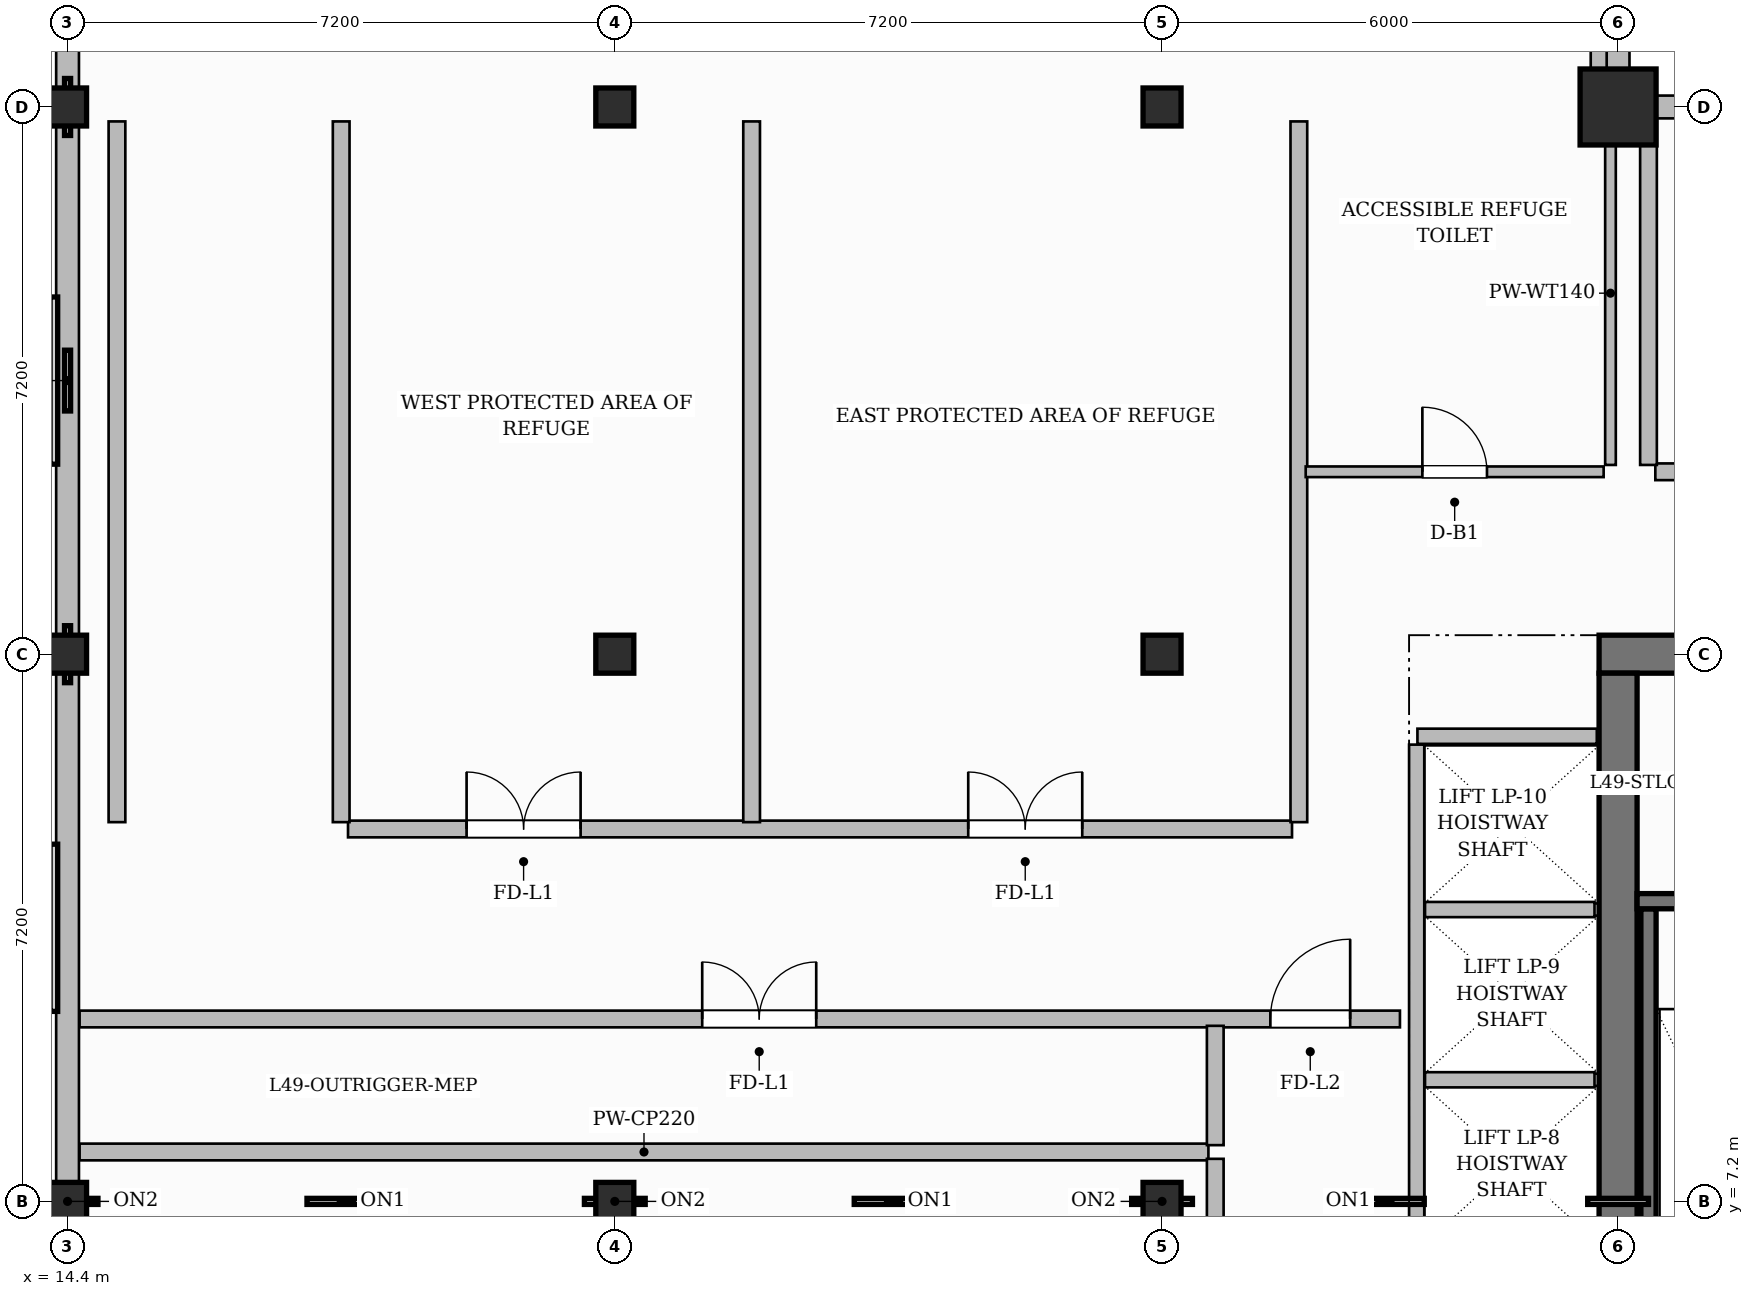
"""IFC4 building model, lengths in metres.
Left out: names, types, materials, properties, quantities, classifications, styles, units other than length and angle.
Written with IfcOpenShell. Run it as: python <this file> out.ifc"""

import sys

from ifc_helpers import new_model, si_unit, direction, frame, frame_2d, origin, origin_2d, place, context, subcontext, project, spatial, rectangle, hollow_rectangle, extrude, source, transform, mapped, element, fill, save


model = new_model("IFC4")
c1 = context("Model", 3, precision=1e-05, world=origin(), true_north=direction((0.0, 1.0)))
c2 = subcontext(c1, "Body", "Model", "MODEL_VIEW")
j1 = project(units=[si_unit("LENGTHUNIT", "METRE"), si_unit("PLANEANGLEUNIT", "RADIAN")], contexts=[c1])
p1 = place(None, origin())
s1 = spatial("IfcSite", under=j1, at=p1, CompositionType="ELEMENT")
p2 = place(p1, origin())
s2 = spatial("IfcBuilding", under=s1, at=p2, CompositionType="ELEMENT")
p3 = place(p2, frame((0.0, 0.0, 196.5)))
s3 = spatial("IfcBuildingStorey", under=s2, at=p3, CompositionType="ELEMENT", Elevation=196.5)
p4 = place(p3, frame((34.55, 14.4, 0.0), z_axis=(0.0, 0.0, 1.0), x_axis=(1.0, 0.0, 0.0)))
e1 = element("IfcWall", 1, at=p4, inside=s3, PredefinedType="SHEAR", context=c2, shape_type="SweptSolid", body=[
    extrude(rectangle(XDim=15.5, YDim=0.5, at=frame_2d((7.75, 0.0))), origin(), (0.0, 0.0, 1.0), 5.4),
])
p5 = place(p4, frame((5.38, 0.0, 0.0)))
e2 = element("IfcOpeningElement", 2, at=p5, cuts=e1, PredefinedType="OPENING", context=c2, shape_type="SweptSolid", body=[
    extrude(rectangle(XDim=1.5, YDim=2.2, at=frame_2d((0.75, 1.1))), frame((0.0, 0.26, 0.0), z_axis=(0.0, -1.0, 0.0), x_axis=(1.0, 0.0, 0.0)), (0.0, 0.0, 1.0), 0.52),
])
p6 = place(p4, frame((1.595, 0.0, 0.0)))
e3 = element("IfcOpeningElement", 3, at=p6, cuts=e1, PredefinedType="OPENING", context=c2, shape_type="SweptSolid", body=[
    extrude(rectangle(XDim=1.05, YDim=2.15, at=frame_2d((0.525, 1.075))), frame((0.0, 0.26, 0.0), z_axis=(0.0, -1.0, 0.0), x_axis=(1.0, 0.0, 0.0)), (0.0, 0.0, 1.0), 0.52),
])
p7 = place(p4, frame((11.225, 0.0, 0.0)))
e4 = element("IfcOpeningElement", 4, at=p7, cuts=e1, PredefinedType="OPENING", context=c2, shape_type="SweptSolid", body=[
    extrude(rectangle(XDim=1.05, YDim=2.15, at=frame_2d((0.525, 1.075))), frame((0.0, 0.26, 0.0), z_axis=(0.0, -1.0, 0.0), x_axis=(1.0, 0.0, 0.0)), (0.0, 0.0, 1.0), 0.52),
])
p8 = place(p3, frame((34.8, 3.85, 0.0), z_axis=(0.0, 0.0, 1.0), x_axis=(0.0, 1.0, 0.0)))
e5 = element("IfcWall", 5, at=p8, inside=s3, PredefinedType="SHEAR", context=c2, shape_type="SweptSolid", body=[
    extrude(rectangle(XDim=10.3, YDim=0.5, at=frame_2d((5.15, 0.0))), origin(), (0.0, 0.0, 1.0), 5.4),
])
m1 = source(origin(), c2, "Body", "SweptSolid", [
    extrude(hollow_rectangle(XDim=0.5, YDim=0.5, WallThickness=0.03, InnerFilletRadius=0.03, OuterFilletRadius=0.06, at=origin_2d()), origin(), (0.0, 0.0, 1.0), 5.4),
])
for number, where, z_axis, x_axis in (
    (6, (14.4, 7.2, 0.0), (0.0, 0.0, 1.0), (1.0, 0.0, 0.0)),
    (7, (14.4, 14.4, 0.0), (0.0, 0.0, 1.0), (1.0, 0.0, 0.0)),
    (8, (14.4, 21.6, 0.0), (0.0, 0.0, 1.0), (1.0, 0.0, 0.0)),
    (9, (21.6, 7.2, 0.0), (0.0, 0.0, 1.0), (1.0, 0.0, 0.0)),
    (10, (21.6, 14.4, 0.0), (0.0, 0.0, 1.0), (1.0, 0.0, 0.0)),
    (11, (21.6, 21.6, 0.0), (0.0, 0.0, 1.0), (1.0, 0.0, 0.0)),
    (12, (28.8, 7.2, 0.0), (0.0, 0.0, 1.0), (1.0, 0.0, 0.0)),
    (13, (28.8, 14.4, 0.0), (0.0, 0.0, 1.0), (1.0, 0.0, 0.0)),
    (14, (28.8, 21.6, 0.0), (0.0, 0.0, 1.0), (1.0, 0.0, 0.0)),
):
    element("IfcColumn", number, at=place(p3, frame(where, z_axis=z_axis, x_axis=x_axis)), inside=s3, PredefinedType="COLUMN", context=c2, shape_type="MappedRepresentation", body=[
        mapped(m1, transform((0.0, 0.0, 0.0), scale=1.0)),
    ])
m2 = source(origin(), c2, "Body", "SweptSolid", [
    extrude(rectangle(XDim=1.0, YDim=1.0, at=origin_2d()), origin(), (0.0, 0.0, 1.0), 5.4),
])
p9 = place(p3, frame((34.8, 21.6, 0.0), z_axis=(0.0, 0.0, 1.0), x_axis=(1.0, 0.0, 0.0)))
e15 = element("IfcColumn", 15, at=p9, inside=s3, PredefinedType="COLUMN", context=c2, shape_type="MappedRepresentation", body=[
    mapped(m2, transform((0.0, 0.0, 0.0), scale=1.0)),
])
p10 = place(p3, frame((35.2, 4.1, 0.0), z_axis=(0.0, 0.0, 1.0), x_axis=(0.0, 1.0, 0.0)))
e16 = element("IfcWall", 16, at=p10, inside=s3, PredefinedType="SHEAR", context=c2, shape_type="SweptSolid", body=[
    extrude(rectangle(XDim=6.95, YDim=0.2, at=frame_2d((3.475, 0.0))), origin(), (0.0, 0.0, 1.0), 5.4),
])
p11 = place(p3, frame((35.05, 11.15, 0.0), z_axis=(0.0, 0.0, 1.0), x_axis=(1.0, 0.0, 0.0)))
e17 = element("IfcWall", 17, at=p11, inside=s3, PredefinedType="SHEAR", context=c2, shape_type="SweptSolid", body=[
    extrude(rectangle(XDim=3.19, YDim=0.2, at=frame_2d((1.595, 0.0))), origin(), (0.0, 0.0, 1.0), 5.4),
])
p12 = place(p11, frame((1.095, 0.0, 0.0)))
e18 = element("IfcOpeningElement", 18, at=p12, cuts=e17, PredefinedType="OPENING", context=c2, shape_type="SweptSolid", body=[
    extrude(rectangle(XDim=1.05, YDim=2.2, at=frame_2d((0.525, 1.1))), frame((0.0, 0.11, 0.0), z_axis=(0.0, -1.0, 0.0), x_axis=(1.0, 0.0, 0.0)), (0.0, 0.0, 1.0), 0.22),
])
p13 = place(p3, frame((32.16, 13.32, 0.0), z_axis=(0.0, 0.0, 1.0), x_axis=(1.0, 0.0, 0.0)))
e19 = element("IfcWall", 19, at=p13, inside=s3, PredefinedType="PARTITIONING", context=c2, shape_type="SweptSolid", body=[
    extrude(rectangle(XDim=2.36, YDim=0.2, at=frame_2d((1.18, 0.0))), origin(), (0.0, 0.0, 1.0), 5.15),
])
p14 = place(p3, frame((32.15, 4.39, 0.0), z_axis=(0.0, 0.0, 1.0), x_axis=(0.0, 1.0, 0.0)))
e20 = element("IfcWall", 20, at=p14, inside=s3, PredefinedType="PARTITIONING", context=c2, shape_type="SweptSolid", body=[
    extrude(rectangle(XDim=8.82, YDim=0.2, at=frame_2d((4.41, 0.0))), origin(), (0.0, 0.0, 1.0), 5.15),
])
for number, where, z_axis, x_axis in (
    (21, (32.26, 8.8, 0.0), (0.0, 0.0, 1.0), (1.0, 0.0, 0.0)),
    (22, (32.26, 11.04, 0.0), (0.0, 0.0, 1.0), (1.0, 0.0, 0.0)),
):
    element("IfcWall", number, at=place(p3, frame(where, z_axis=z_axis, x_axis=x_axis)), inside=s3, PredefinedType="PARTITIONING", context=c2, shape_type="SweptSolid", body=[
        extrude(rectangle(XDim=2.23, YDim=0.2, at=frame_2d((1.115, 0.0))), origin(), (0.0, 0.0, 1.0), 5.15),
    ])
p15 = place(p3, frame((14.558, 7.85, 0.0), z_axis=(0.0, 0.0, 1.0), x_axis=(1.0, 0.0, 0.0)))
e23 = element("IfcWall", 23, at=p15, inside=s3, PredefinedType="PARTITIONING", context=c2, shape_type="SweptSolid", body=[
    extrude(rectangle(XDim=14.852, YDim=0.22, at=frame_2d((7.426, 0.0))), origin(), (0.0, 0.0, 1.0), 5.15),
])
p16 = place(p3, frame((29.5, 6.64, 0.0), z_axis=(0.0, 0.0, 1.0), x_axis=(0.0, 1.0, 0.0)))
e24 = element("IfcWall", 24, at=p16, inside=s3, PredefinedType="PARTITIONING", context=c2, shape_type="SweptSolid", body=[
    extrude(rectangle(XDim=1.12, YDim=0.22, at=frame_2d((0.56, 0.0))), origin(), (0.0, 0.0, 1.0), 5.15),
])
p17 = place(p3, frame((15.05, 12.19, 0.0), z_axis=(0.0, 0.0, 1.0), x_axis=(0.0, 1.0, 0.0)))
e25 = element("IfcWall", 25, at=p17, inside=s3, PredefinedType="PARTITIONING", context=c2, shape_type="SweptSolid", body=[
    extrude(rectangle(XDim=9.22, YDim=0.22, at=frame_2d((4.61, 0.0))), origin(), (0.0, 0.0, 1.0), 5.15),
])
p18 = place(p3, frame((14.558, 9.6, 0.0), z_axis=(0.0, 0.0, 1.0), x_axis=(1.0, 0.0, 0.0)))
e26 = element("IfcWall", 26, at=p18, inside=s3, PredefinedType="PARTITIONING", context=c2, shape_type="SweptSolid", body=[
    extrude(rectangle(XDim=17.372, YDim=0.22, at=frame_2d((8.686, 0.0))), origin(), (0.0, 0.0, 1.0), 5.15),
])
p19 = place(p18, frame((15.667, 0.0, 0.0)))
e27 = element("IfcOpeningElement", 27, at=p19, cuts=e26, PredefinedType="OPENING", context=c2, shape_type="SweptSolid", body=[
    extrude(rectangle(XDim=1.05, YDim=2.15, at=frame_2d((0.525, 1.075))), frame((0.0, 0.12, 0.0), z_axis=(0.0, -1.0, 0.0), x_axis=(1.0, 0.0, 0.0)), (0.0, 0.0, 1.0), 0.24),
])
p20 = place(p18, frame((8.192, 0.0, 0.0)))
e28 = element("IfcOpeningElement", 28, at=p20, cuts=e26, PredefinedType="OPENING", context=c2, shape_type="SweptSolid", body=[
    extrude(rectangle(XDim=1.5, YDim=2.2, at=frame_2d((0.75, 1.1))), frame((0.0, 0.12, 0.0), z_axis=(0.0, -1.0, 0.0), x_axis=(1.0, 0.0, 0.0)), (0.0, 0.0, 1.0), 0.24),
])
p21 = place(p3, frame((18.09, 12.1, 0.0), z_axis=(0.0, 0.0, 1.0), x_axis=(1.0, 0.0, 0.0)))
e29 = element("IfcWall", 29, at=p21, inside=s3, PredefinedType="PARTITIONING", context=c2, shape_type="SweptSolid", body=[
    extrude(rectangle(XDim=12.42, YDim=0.22, at=frame_2d((6.21, 0.0))), origin(), (0.0, 0.0, 1.0), 5.15),
])
p22 = place(p21, frame((1.56, 0.0, 0.0)))
e30 = element("IfcOpeningElement", 30, at=p22, cuts=e29, PredefinedType="OPENING", context=c2, shape_type="SweptSolid", body=[
    extrude(rectangle(XDim=1.5, YDim=2.2, at=frame_2d((0.75, 1.1))), frame((0.0, 0.12, 0.0), z_axis=(0.0, -1.0, 0.0), x_axis=(1.0, 0.0, 0.0)), (0.0, 0.0, 1.0), 0.24),
])
p23 = place(p21, frame((8.16, 0.0, 0.0)))
e31 = element("IfcOpeningElement", 31, at=p23, cuts=e29, PredefinedType="OPENING", context=c2, shape_type="SweptSolid", body=[
    extrude(rectangle(XDim=1.5, YDim=2.2, at=frame_2d((0.75, 1.1))), frame((0.0, 0.12, 0.0), z_axis=(0.0, -1.0, 0.0), x_axis=(1.0, 0.0, 0.0)), (0.0, 0.0, 1.0), 0.24),
])
p24 = place(p3, frame((29.5, 7.94, 0.0), z_axis=(0.0, 0.0, 1.0), x_axis=(0.0, 1.0, 0.0)))
e32 = element("IfcWall", 32, at=p24, inside=s3, PredefinedType="PARTITIONING", context=c2, shape_type="SweptSolid", body=[
    extrude(rectangle(XDim=1.57, YDim=0.22, at=frame_2d((0.785, 0.0))), origin(), (0.0, 0.0, 1.0), 5.15),
])
p25 = place(p3, frame((18.0, 12.19, 0.0), z_axis=(0.0, 0.0, 1.0), x_axis=(0.0, 1.0, 0.0)))
e33 = element("IfcWall", 33, at=p25, inside=s3, PredefinedType="PARTITIONING", context=c2, shape_type="SweptSolid", body=[
    extrude(rectangle(XDim=9.22, YDim=0.22, at=frame_2d((4.61, 0.0))), origin(), (0.0, 0.0, 1.0), 4.685),
])
for number, where, z_axis, x_axis in (
    (34, (23.4, 12.19, 0.0), (0.0, 0.0, 1.0), (0.0, 1.0, 0.0)),
    (35, (30.6, 12.19, 0.0), (0.0, 0.0, 1.0), (0.0, 1.0, 0.0)),
):
    element("IfcWall", number, at=place(p3, frame(where, z_axis=z_axis, x_axis=x_axis)), inside=s3, PredefinedType="PARTITIONING", context=c2, shape_type="SweptSolid", body=[
        extrude(rectangle(XDim=9.22, YDim=0.22, at=frame_2d((4.61, 0.0))), origin(), (0.0, 0.0, 1.0), 5.15),
    ])
p26 = place(p3, frame((30.69, 16.8, 0.0), z_axis=(0.0, 0.0, 1.0), x_axis=(1.0, 0.0, 0.0)))
e36 = element("IfcWall", 36, at=p26, inside=s3, PredefinedType="PARTITIONING", context=c2, shape_type="SweptSolid", body=[
    extrude(rectangle(XDim=3.92, YDim=0.14, at=frame_2d((1.96, 0.0))), origin(), (0.0, 0.0, 1.0), 5.15),
])
p27 = place(p26, frame((1.535, 0.0, 0.0)))
e37 = element("IfcOpeningElement", 37, at=p27, cuts=e36, PredefinedType="OPENING", context=c2, shape_type="SweptSolid", body=[
    extrude(rectangle(XDim=0.85, YDim=2.1, at=frame_2d((0.425, 1.05))), frame((0.0, 0.08, 0.0), z_axis=(0.0, -1.0, 0.0), x_axis=(1.0, 0.0, 0.0)), (0.0, 0.0, 1.0), 0.16),
])
p28 = place(p3, frame((34.7, 16.89, 0.0), z_axis=(0.0, 0.0, 1.0), x_axis=(0.0, 1.0, 0.0)))
e38 = element("IfcWall", 38, at=p28, inside=s3, PredefinedType="PARTITIONING", context=c2, shape_type="SweptSolid", body=[
    extrude(rectangle(XDim=4.52, YDim=0.14, at=frame_2d((2.26, 0.0))), origin(), (0.0, 0.0, 1.0), 4.485),
])
p29 = place(p3, frame((35.29, 16.8, 0.0), z_axis=(0.0, 0.0, 1.0), x_axis=(1.0, 0.0, 0.0)))
e39 = element("IfcWall", 39, at=p29, inside=s3, PredefinedType="PARTITIONING", context=c2, shape_type="SweptSolid", body=[
    extrude(rectangle(XDim=14.352, YDim=0.22, at=frame_2d((7.176, 0.0))), origin(), (0.0, 0.0, 1.0), 5.15),
])
p30 = place(p29, frame((4.76, 0.0, 0.0)))
e40 = element("IfcOpeningElement", 40, at=p30, cuts=e39, PredefinedType="OPENING", context=c2, shape_type="SweptSolid", body=[
    extrude(rectangle(XDim=1.5, YDim=2.2, at=frame_2d((0.75, 1.1))), frame((0.0, 0.12, 0.0), z_axis=(0.0, -1.0, 0.0), x_axis=(1.0, 0.0, 0.0)), (0.0, 0.0, 1.0), 0.24),
])
p31 = place(p3, frame((35.2, 16.89, 0.0), z_axis=(0.0, 0.0, 1.0), x_axis=(0.0, 1.0, 0.0)))
e41 = element("IfcWall", 41, at=p31, inside=s3, PredefinedType="PARTITIONING", context=c2, shape_type="SweptSolid", body=[
    extrude(rectangle(XDim=4.52, YDim=0.22, at=frame_2d((2.26, 0.0))), origin(), (0.0, 0.0, 1.0), 5.15),
])
p32 = place(p3, frame((34.55, 21.69, 0.0), z_axis=(0.0, 0.0, 1.0), x_axis=(0.0, 1.0, 0.0)))
e42 = element("IfcWall", 42, at=p32, inside=s3, PredefinedType="PARTITIONING", context=c2, shape_type="SweptSolid", body=[
    extrude(rectangle(XDim=10.47, YDim=0.22, at=frame_2d((5.235, 0.0))), origin(), (0.0, 0.0, 1.0), 4.485),
])
p33 = place(p3, frame((34.8, 21.6, 0.0), z_axis=(0.0, 0.0, 1.0), x_axis=(1.0, 0.0, 0.0)))
e43 = element("IfcWall", 43, at=p33, inside=s3, PredefinedType="SOLIDWALL", context=c2, shape_type="SweptSolid", body=[
    extrude(rectangle(XDim=15.0, YDim=0.3, at=frame_2d((7.5, 0.0))), origin(), (0.0, 0.0, 1.0), 4.485),
])
p34 = place(p3, frame((14.4, 0.05, 0.0), z_axis=(0.0, 0.0, 1.0), x_axis=(0.0, 1.0, 0.0)))
e44 = element("IfcWall", 44, at=p34, inside=s3, PredefinedType="SOLIDWALL", context=c2, shape_type="SweptSolid", body=[
    extrude(rectangle(XDim=25.1, YDim=0.3, at=frame_2d((12.55, 0.0))), origin(), (0.0, 0.0, 1.0), 4.485),
])
p35 = place(p3, frame((34.8, 21.65, 0.0), z_axis=(0.0, 0.0, 1.0), x_axis=(0.0, 1.0, 0.0)))
e45 = element("IfcWall", 45, at=p35, inside=s3, PredefinedType="SOLIDWALL", context=c2, shape_type="SweptSolid", body=[
    extrude(rectangle(XDim=10.75, YDim=0.3, at=frame_2d((5.375, 0.0))), origin(), (0.0, 0.0, 1.0), 4.485),
])
m3 = source(origin(), c2, "Body", "SweptSolid", [
    extrude(rectangle(XDim=1.05, YDim=2.15, at=frame_2d((0.525, 1.075))), frame((0.0, 0.025, 0.0), z_axis=(0.0, -1.0, 0.0), x_axis=(1.0, 0.0, 0.0)), (0.0, 0.0, 1.0), 0.05),
])
p36 = place(p19, origin())
e46 = element("IfcDoor", 46, at=p36, inside=s3, OperationType="SINGLE_SWING_RIGHT", PredefinedType="DOOR", context=c2, shape_type="MappedRepresentation", body=[
    mapped(m3, transform((0.0, 0.0, 0.0), scale=1.0)),
])
fill(e27, e46)
m4 = source(origin(), c2, "Body", "SweptSolid", [
    extrude(rectangle(XDim=1.5, YDim=2.2, at=frame_2d((0.75, 1.1))), frame((0.0, 0.025, 0.0), z_axis=(0.0, -1.0, 0.0), x_axis=(1.0, 0.0, 0.0)), (0.0, 0.0, 1.0), 0.05),
])
p37 = place(p20, origin())
e47 = element("IfcDoor", 47, at=p37, inside=s3, OperationType="DOUBLE_DOOR_SINGLE_SWING", PredefinedType="DOOR", context=c2, shape_type="MappedRepresentation", body=[
    mapped(m4, transform((0.0, 0.0, 0.0), scale=1.0)),
])
fill(e28, e47)
p38 = place(p22, origin())
e48 = element("IfcDoor", 48, at=p38, inside=s3, OperationType="DOUBLE_DOOR_SINGLE_SWING", PredefinedType="DOOR", context=c2, shape_type="MappedRepresentation", body=[
    mapped(m4, transform((0.0, 0.0, 0.0), scale=1.0)),
])
fill(e30, e48)
p39 = place(p23, origin())
e49 = element("IfcDoor", 49, at=p39, inside=s3, OperationType="DOUBLE_DOOR_SINGLE_SWING", PredefinedType="DOOR", context=c2, shape_type="MappedRepresentation", body=[
    mapped(m4, transform((0.0, 0.0, 0.0), scale=1.0)),
])
fill(e31, e49)
m5 = source(origin(), c2, "Body", "SweptSolid", [
    extrude(rectangle(XDim=0.85, YDim=2.1, at=frame_2d((0.425, 1.05))), frame((0.0, 0.025, 0.0), z_axis=(0.0, -1.0, 0.0), x_axis=(1.0, 0.0, 0.0)), (0.0, 0.0, 1.0), 0.05),
])
p40 = place(p27, origin())
e50 = element("IfcDoor", 50, at=p40, inside=s3, OperationType="SINGLE_SWING_LEFT", PredefinedType="DOOR", context=c2, shape_type="MappedRepresentation", body=[
    mapped(m5, transform((0.0, 0.0, 0.0), scale=1.0)),
])
fill(e37, e50)
save(model, sys.argv[1])
